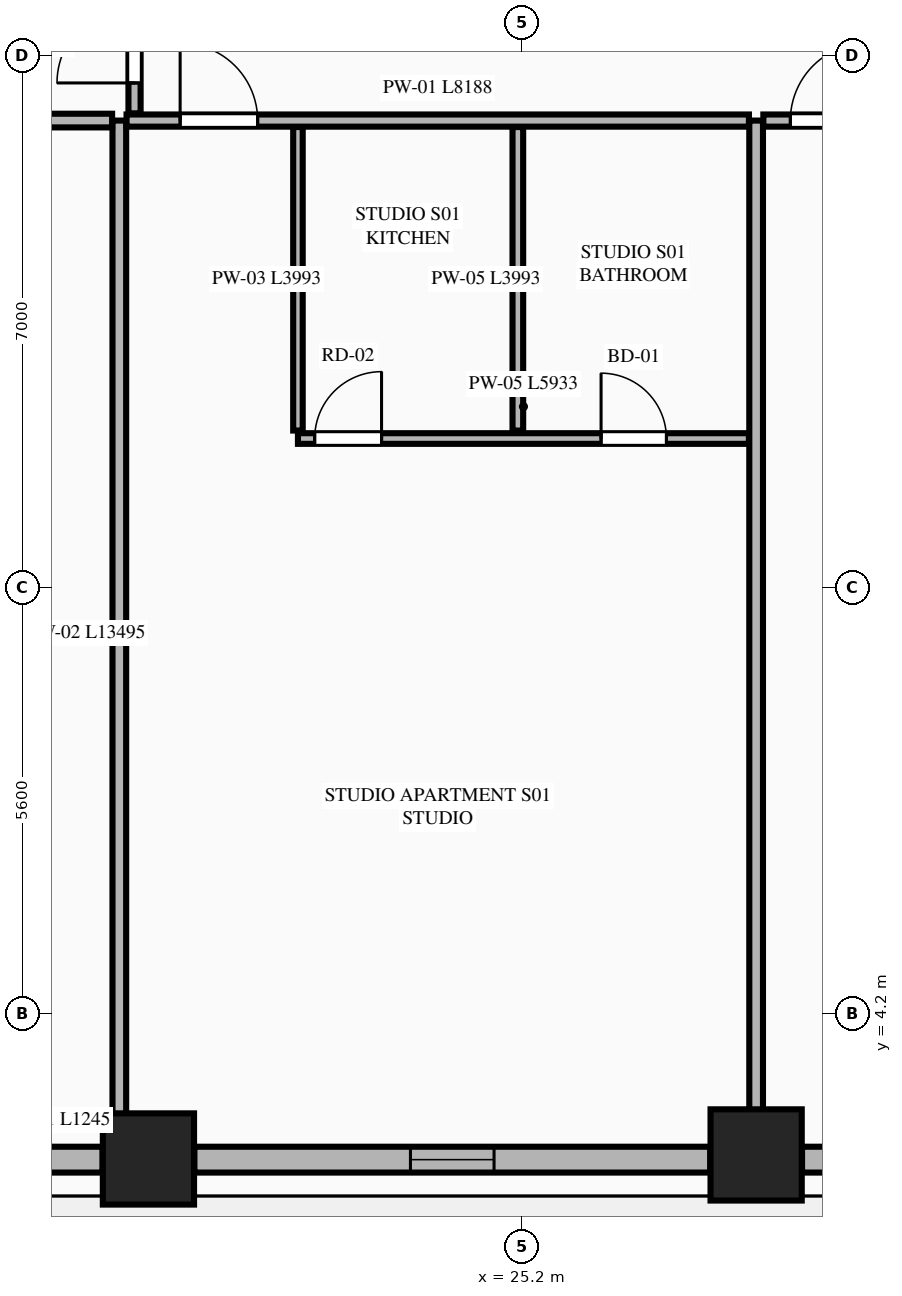
"""IFC4 building model, lengths in metres.
Left out: names, types, materials, properties, quantities, classifications, styles, units other than length and angle.
Written with IfcOpenShell. Run it as: python <this file> out.ifc"""

import sys

from ifc_helpers import new_model, si_unit, direction, frame, frame_2d, origin, origin_2d, place, context, subcontext, project, spatial, rectangle, extrude, element, fill, save


model = new_model("IFC4")
c1 = context("Model", 3, precision=1e-05, world=origin(), true_north=direction((0.0, 1.0)))
c2 = subcontext(c1, "Body", "Model", "MODEL_VIEW")
j1 = project(units=[si_unit("LENGTHUNIT", "METRE"), si_unit("PLANEANGLEUNIT", "RADIAN")], contexts=[c1])
p1 = place(None, origin())
s1 = spatial("IfcSite", under=j1, at=p1, CompositionType="ELEMENT")
p2 = place(p1, origin())
s2 = spatial("IfcBuilding", under=s1, at=p2, CompositionType="ELEMENT")
p3 = place(p2, frame((0.0, 0.0, 42.65)))
s3 = spatial("IfcBuildingStorey", under=s2, at=p3, CompositionType="ELEMENT", Elevation=42.65)
for number, where, z_axis, x_axis in (
    (1, (20.283, 2.289, 0.0), (0.0, 0.0, 1.0), (1.0, 0.0, 0.0)),
    (2, (28.278, 2.342, 0.0), (0.0, 0.0, 1.0), (1.0, 0.0, 0.0)),
):
    element("IfcColumn", number, at=place(p3, frame(where, z_axis=z_axis, x_axis=x_axis)), inside=s3, PredefinedType="COLUMN", context=c2, shape_type="SweptSolid", body=[
        extrude(rectangle(XDim=1.2, YDim=1.2, at=origin_2d()), origin(), (0.0, 0.0, 1.0), 3.55),
    ])
p4 = place(p3, frame((18.434, 2.28, 0.0), z_axis=(0.0, 0.0, 1.0), x_axis=(1.0, 0.0, 0.0)))
e3 = element("IfcWall", 3, at=p4, inside=s3, PredefinedType="STANDARD", context=c2, shape_type="SweptSolid", body=[
    extrude(rectangle(XDim=1.245, YDim=0.34, at=frame_2d((0.623, 0.0))), origin(), (0.0, 0.0, 1.0), 3.33),
])
p5 = place(p3, frame((20.887, 2.28, 0.0), z_axis=(0.0, 0.0, 1.0), x_axis=(1.0, 0.0, 0.0)))
e4 = element("IfcWall", 4, at=p5, inside=s3, PredefinedType="STANDARD", context=c2, shape_type="SweptSolid", body=[
    extrude(rectangle(XDim=6.787, YDim=0.34, at=frame_2d((3.394, 0.0))), origin(), (0.0, 0.0, 1.0), 2.787),
])
p6 = place(p5, frame((2.843, 0.0, 0.75)))
e5 = element("IfcOpeningElement", 5, at=p6, cuts=e4, PredefinedType="OPENING", context=c2, shape_type="SweptSolid", body=[
    extrude(rectangle(XDim=1.1, YDim=1.887, at=frame_2d((0.55, 0.943))), frame((0.0, 0.18, 0.0), z_axis=(0.0, -1.0, 0.0), x_axis=(1.0, 0.0, 0.0)), (0.0, 0.0, 1.0), 0.36),
])
p7 = place(p3, frame((28.882, 2.28, 0.0), z_axis=(0.0, 0.0, 1.0), x_axis=(1.0, 0.0, 0.0)))
e6 = element("IfcWall", 6, at=p7, inside=s3, PredefinedType="STANDARD", context=c2, shape_type="SweptSolid", body=[
    extrude(rectangle(XDim=7.036, YDim=0.34, at=frame_2d((3.518, 0.0))), origin(), (0.0, 0.0, 1.0), 2.787),
])
p8 = place(p7, frame((2.968, 0.0, 0.0)))
e7 = element("IfcOpeningElement", 7, at=p8, cuts=e6, PredefinedType="OPENING", context=c2, shape_type="SweptSolid", body=[
    extrude(rectangle(XDim=1.1, YDim=2.25, at=frame_2d((0.55, 1.125))), frame((0.0, 0.18, 0.0), z_axis=(0.0, -1.0, 0.0), x_axis=(1.0, 0.0, 0.0)), (0.0, 0.0, 1.0), 0.36),
])
p9 = place(p3, frame((19.9, 2.455, 0.0), z_axis=(0.0, 0.0, 1.0), x_axis=(0.0, 1.0, 0.0)))
e8 = element("IfcWall", 8, at=p9, inside=s3, PredefinedType="PARTITIONING", context=c2, shape_type="SweptSolid", body=[
    extrude(rectangle(XDim=13.495, YDim=0.18, at=frame_2d((6.748, 0.0))), origin(), (0.0, 0.0, 1.0), 3.33),
])
p10 = place(p3, frame((28.278, 2.455, 0.0), z_axis=(0.0, 0.0, 1.0), x_axis=(0.0, 1.0, 0.0)))
e9 = element("IfcWall", 9, at=p10, inside=s3, PredefinedType="PARTITIONING", context=c2, shape_type="SweptSolid", body=[
    extrude(rectangle(XDim=13.495, YDim=0.18, at=frame_2d((6.748, 0.0))), origin(), (0.0, 0.0, 1.0), 2.7),
])
p11 = place(p3, frame((19.995, 15.95, 0.0), z_axis=(0.0, 0.0, 1.0), x_axis=(1.0, 0.0, 0.0)))
e10 = element("IfcWall", 10, at=p11, inside=s3, PredefinedType="PARTITIONING", context=c2, shape_type="SweptSolid", body=[
    extrude(rectangle(XDim=8.188, YDim=0.16, at=frame_2d((4.094, 0.0))), origin(), (0.0, 0.0, 1.0), 3.33),
])
p12 = place(p11, frame((0.705, 0.0, 0.0)))
e11 = element("IfcOpeningElement", 11, at=p12, cuts=e10, PredefinedType="OPENING", context=c2, shape_type="SweptSolid", body=[
    extrude(rectangle(XDim=1.02, YDim=2.25, at=frame_2d((0.51, 1.125))), frame((0.0, 0.09, 0.0), z_axis=(0.0, -1.0, 0.0), x_axis=(1.0, 0.0, 0.0)), (0.0, 0.0, 1.0), 0.18),
])
p13 = place(p3, frame((22.25, 11.872, 0.0), z_axis=(0.0, 0.0, 1.0), x_axis=(0.0, 1.0, 0.0)))
e12 = element("IfcWall", 12, at=p13, inside=s3, PredefinedType="PARTITIONING", context=c2, shape_type="SweptSolid", body=[
    extrude(rectangle(XDim=3.993, YDim=0.125, at=frame_2d((1.997, 0.0))), origin(), (0.0, 0.0, 1.0), 2.7),
])
p14 = place(p3, frame((22.25, 11.767, 0.0), z_axis=(0.0, 0.0, 1.0), x_axis=(1.0, 0.0, 0.0)))
e13 = element("IfcWall", 13, at=p14, inside=s3, PredefinedType="PLUMBINGWALL", context=c2, shape_type="SweptSolid", body=[
    extrude(rectangle(XDim=5.933, YDim=0.14, at=frame_2d((2.967, 0.0))), origin(), (0.0, 0.0, 1.0), 3.33),
])
p15 = place(p14, frame((3.988, 0.0, 0.0)))
e14 = element("IfcOpeningElement", 14, at=p15, cuts=e13, PredefinedType="OPENING", context=c2, shape_type="SweptSolid", body=[
    extrude(rectangle(XDim=0.86, YDim=2.1, at=frame_2d((0.43, 1.05))), frame((0.0, 0.08, 0.0), z_axis=(0.0, -1.0, 0.0), x_axis=(1.0, 0.0, 0.0)), (0.0, 0.0, 1.0), 0.16),
])
p16 = place(p14, frame((0.22, 0.0, 0.0)))
e15 = element("IfcOpeningElement", 15, at=p16, cuts=e13, PredefinedType="OPENING", context=c2, shape_type="SweptSolid", body=[
    extrude(rectangle(XDim=0.88, YDim=2.15, at=frame_2d((0.44, 1.075))), frame((0.0, 0.08, 0.0), z_axis=(0.0, -1.0, 0.0), x_axis=(1.0, 0.0, 0.0)), (0.0, 0.0, 1.0), 0.16),
])
p17 = place(p3, frame((25.143, 11.872, 0.0), z_axis=(0.0, 0.0, 1.0), x_axis=(0.0, 1.0, 0.0)))
e16 = element("IfcWall", 16, at=p17, inside=s3, PredefinedType="PLUMBINGWALL", context=c2, shape_type="SweptSolid", body=[
    extrude(rectangle(XDim=3.993, YDim=0.14, at=frame_2d((1.997, 0.0))), origin(), (0.0, 0.0, 1.0), 3.33),
])
p18 = place(p3, frame((28.373, 15.95, 0.0), z_axis=(0.0, 0.0, 1.0), x_axis=(1.0, 0.0, 0.0)))
e17 = element("IfcWall", 17, at=p18, inside=s3, PredefinedType="PARTITIONING", context=c2, shape_type="SweptSolid", body=[
    extrude(rectangle(XDim=8.054, YDim=0.16, at=frame_2d((4.027, 0.0))), origin(), (0.0, 0.0, 1.0), 3.33),
])
p19 = place(p18, frame((0.355, 0.0, 0.0)))
e18 = element("IfcOpeningElement", 18, at=p19, cuts=e17, PredefinedType="OPENING", context=c2, shape_type="SweptSolid", body=[
    extrude(rectangle(XDim=1.02, YDim=2.25, at=frame_2d((0.51, 1.125))), frame((0.0, 0.09, 0.0), z_axis=(0.0, -1.0, 0.0), x_axis=(1.0, 0.0, 0.0)), (0.0, 0.0, 1.0), 0.18),
])
p20 = place(p3, frame((10.564, 15.95, 0.0), z_axis=(0.0, 0.0, 1.0), x_axis=(1.0, 0.0, 0.0)))
e19 = element("IfcWall", 19, at=p20, inside=s3, PredefinedType="PARTITIONING", context=c2, shape_type="SweptSolid", body=[
    extrude(rectangle(XDim=9.241, YDim=0.18, at=frame_2d((4.621, 0.0))), origin(), (0.0, 0.0, 1.0), 3.33),
])
p21 = place(p3, frame((20.1, 16.045, 0.0), z_axis=(0.0, 0.0, 1.0), x_axis=(0.0, 1.0, 0.0)))
e20 = element("IfcWall", 20, at=p21, inside=s3, PredefinedType="PARTITIONING", context=c2, shape_type="SweptSolid", body=[
    extrude(rectangle(XDim=6.576, YDim=0.16, at=frame_2d((3.288, 0.0))), origin(), (0.0, 0.0, 1.0), 2.7),
])
p22 = place(p21, frame((0.4, 0.0, 0.0)))
e21 = element("IfcOpeningElement", 21, at=p22, cuts=e20, PredefinedType="OPENING", context=c2, shape_type="SweptSolid", body=[
    extrude(rectangle(XDim=1.02, YDim=2.25, at=frame_2d((0.51, 1.125))), frame((0.0, 0.09, 0.0), z_axis=(0.0, -1.0, 0.0), x_axis=(1.0, 0.0, 0.0)), (0.0, 0.0, 1.0), 0.18),
])
p23 = place(p6, origin())
e22 = element("IfcWindow", 22, at=p23, inside=s3, PartitioningType="SINGLE_PANEL", PredefinedType="WINDOW", context=c2, shape_type="SweptSolid", body=[
    extrude(rectangle(XDim=1.1, YDim=1.887, at=frame_2d((0.55, 0.943))), frame((0.0, 0.03, 0.0), z_axis=(0.0, -1.0, 0.0), x_axis=(1.0, 0.0, 0.0)), (0.0, 0.0, 1.0), 0.06),
])
fill(e5, e22)
p24 = place(p15, origin())
e23 = element("IfcDoor", 23, at=p24, inside=s3, OperationType="SINGLE_SWING_LEFT", PredefinedType="DOOR", context=c2, shape_type="SweptSolid", body=[
    extrude(rectangle(XDim=0.86, YDim=2.1, at=frame_2d((0.43, 1.05))), frame((0.0, 0.025, 0.0), z_axis=(0.0, -1.0, 0.0), x_axis=(1.0, 0.0, 0.0)), (0.0, 0.0, 1.0), 0.05),
])
fill(e14, e23)
p25 = place(p12, origin())
e24 = element("IfcDoor", 24, at=p25, inside=s3, OperationType="SINGLE_SWING_LEFT", PredefinedType="DOOR", context=c2, shape_type="SweptSolid", body=[
    extrude(rectangle(XDim=1.02, YDim=2.25, at=frame_2d((0.51, 1.125))), frame((0.0, 0.025, 0.0), z_axis=(0.0, -1.0, 0.0), x_axis=(1.0, 0.0, 0.0)), (0.0, 0.0, 1.0), 0.05),
])
fill(e11, e24)
p26 = place(p16, origin())
e25 = element("IfcDoor", 25, at=p26, inside=s3, OperationType="SINGLE_SWING_RIGHT", PredefinedType="DOOR", context=c2, shape_type="SweptSolid", body=[
    extrude(rectangle(XDim=0.88, YDim=2.15, at=frame_2d((0.44, 1.075))), frame((0.0, 0.025, 0.0), z_axis=(0.0, -1.0, 0.0), x_axis=(1.0, 0.0, 0.0)), (0.0, 0.0, 1.0), 0.05),
])
fill(e15, e25)
p27 = place(p19, origin())
e26 = element("IfcDoor", 26, at=p27, inside=s3, OperationType="SINGLE_SWING_RIGHT", PredefinedType="DOOR", context=c2, shape_type="SweptSolid", body=[
    extrude(rectangle(XDim=1.02, YDim=2.25, at=frame_2d((0.51, 1.125))), frame((0.0, 0.025, 0.0), z_axis=(0.0, -1.0, 0.0), x_axis=(1.0, 0.0, 0.0)), (0.0, 0.0, 1.0), 0.05),
])
fill(e18, e26)
p28 = place(p22, origin())
e27 = element("IfcDoor", 27, at=p28, inside=s3, OperationType="SINGLE_SWING_LEFT", PredefinedType="DOOR", context=c2, shape_type="SweptSolid", body=[
    extrude(rectangle(XDim=1.02, YDim=2.25, at=frame_2d((0.51, 1.125))), frame((0.0, 0.025, 0.0), z_axis=(0.0, -1.0, 0.0), x_axis=(1.0, 0.0, 0.0)), (0.0, 0.0, 1.0), 0.05),
])
fill(e21, e27)
save(model, sys.argv[1])
